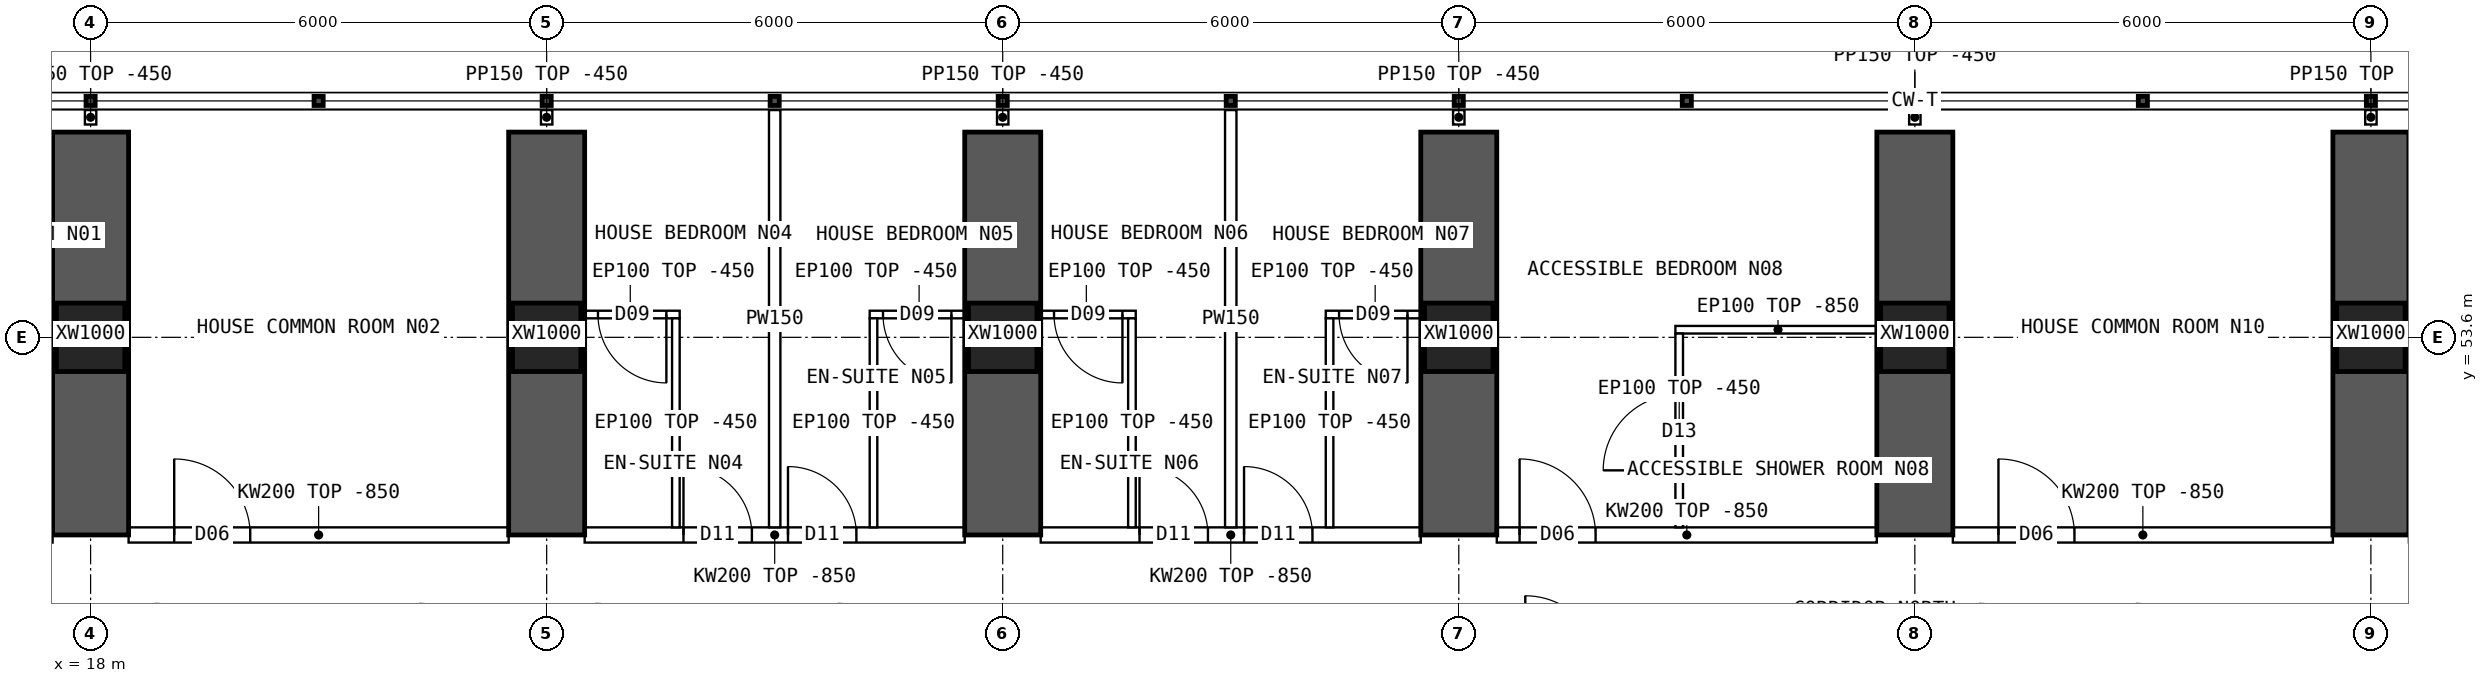
"""IFC4 building model, lengths in metres.
Left out: names, types, materials, properties, quantities, classifications, styles, units other than length and angle.
Written with IfcOpenShell. Run it as: python <this file> out.ifc"""

import sys

from ifc_helpers import new_model, si_unit, direction, frame, frame_2d, origin, origin_2d, place, context, subcontext, project, spatial, polyline, rectangle, hollow_rectangle, outline, extrude, element, fill, save


model = new_model("IFC4")
c1 = context("Model", 3, precision=1e-05, world=origin(), true_north=direction((0.0, 1.0)))
c2 = subcontext(c1, "Body", "Model", "MODEL_VIEW")
j1 = project(units=[si_unit("LENGTHUNIT", "METRE"), si_unit("PLANEANGLEUNIT", "RADIAN")], contexts=[c1])
p1 = place(None, origin())
s1 = spatial("IfcSite", under=j1, at=p1, CompositionType="ELEMENT")
p2 = place(p1, origin())
s2 = spatial("IfcBuilding", under=s1, at=p2, CompositionType="ELEMENT")
p3 = place(p2, frame((0.0, 0.0, 50.2)))
s3 = spatial("IfcBuildingStorey", under=s2, at=p3, CompositionType="ELEMENT", Elevation=50.2)
for number, where, z_axis, x_axis in (
    (1, (18.0, 53.6, 0.0), (0.0, 0.0, 1.0), (1.0, 0.0, 0.0)),
    (2, (24.0, 53.6, 0.0), (0.0, 0.0, 1.0), (1.0, 0.0, 0.0)),
    (3, (30.0, 53.6, 0.0), (0.0, 0.0, 1.0), (1.0, 0.0, 0.0)),
    (4, (36.0, 53.6, 0.0), (0.0, 0.0, 1.0), (1.0, 0.0, 0.0)),
    (5, (42.0, 53.6, 0.0), (0.0, 0.0, 1.0), (1.0, 0.0, 0.0)),
    (6, (48.0, 53.6, 0.0), (0.0, 0.0, 1.0), (1.0, 0.0, 0.0)),
):
    element("IfcColumn", number, at=place(p3, frame(where, z_axis=z_axis, x_axis=x_axis)), inside=s3, PredefinedType="COLUMN", context=c2, shape_type="SweptSolid", body=[
        extrude(hollow_rectangle(XDim=0.9, YDim=0.9, WallThickness=0.09, at=origin_2d()), origin(), (0.0, 0.0, 1.0), 3.75),
    ])
for number, where, z_axis, x_axis in (
    (7, (18.0, 51.0, 0.0), (0.0, 0.0, 1.0), (0.0, 1.0, 0.0)),
    (8, (24.0, 51.0, 0.0), (0.0, 0.0, 1.0), (0.0, 1.0, 0.0)),
    (9, (30.0, 51.0, 0.0), (0.0, 0.0, 1.0), (0.0, 1.0, 0.0)),
    (10, (36.0, 51.0, 0.0), (0.0, 0.0, 1.0), (0.0, 1.0, 0.0)),
    (11, (42.0, 51.0, 0.0), (0.0, 0.0, 1.0), (0.0, 1.0, 0.0)),
    (12, (48.0, 51.0, 0.0), (0.0, 0.0, 1.0), (0.0, 1.0, 0.0)),
):
    element("IfcWall", number, at=place(p3, frame(where, z_axis=z_axis, x_axis=x_axis)), inside=s3, PredefinedType="SHEAR", context=c2, shape_type="SweptSolid", body=[
        extrude(rectangle(XDim=5.3, YDim=1.0, at=frame_2d((2.65, 0.0))), origin(), (0.0, 0.0, 1.0), 3.75),
    ])
p4 = place(p3, frame((18.5, 51.0, 0.0), z_axis=(0.0, 0.0, 1.0), x_axis=(1.0, 0.0, 0.0)))
e13 = element("IfcWall", 13, at=p4, inside=s3, PredefinedType="SOLIDWALL", context=c2, shape_type="SweptSolid", body=[
    extrude(outline(polyline([(0.0, 0.0), (5.0, 0.0), (5.0, 2.9), (0.0, 2.9), (0.0, 0.0)])), frame((0.0, 0.1, 0.0), z_axis=(0.0, -1.0, 0.0), x_axis=(1.0, 0.0, 0.0)), (0.0, 0.0, 1.0), 0.2),
])
p5 = place(p4, frame((0.6, 0.0, 0.0)))
e14 = element("IfcOpeningElement", 14, at=p5, cuts=e13, PredefinedType="OPENING", context=c2, shape_type="SweptSolid", body=[
    extrude(rectangle(XDim=1.0, YDim=2.1, at=frame_2d((0.5, 1.05))), frame((0.0, 0.11, 0.0), z_axis=(0.0, -1.0, 0.0), x_axis=(1.0, 0.0, 0.0)), (0.0, 0.0, 1.0), 0.22),
])
p6 = place(p3, frame((24.5, 51.0, 0.0), z_axis=(0.0, 0.0, 1.0), x_axis=(1.0, 0.0, 0.0)))
e15 = element("IfcWall", 15, at=p6, inside=s3, PredefinedType="SOLIDWALL", context=c2, shape_type="SweptSolid", body=[
    extrude(outline(polyline([(0.0, 0.0), (5.0, 0.0), (5.0, 2.9), (0.0, 2.9), (0.0, 0.0)])), frame((0.0, 0.1, 0.0), z_axis=(0.0, -1.0, 0.0), x_axis=(1.0, 0.0, 0.0)), (0.0, 0.0, 1.0), 0.2),
])
p7 = place(p6, frame((1.3, 0.0, 0.0)))
e16 = element("IfcOpeningElement", 16, at=p7, cuts=e15, PredefinedType="OPENING", context=c2, shape_type="SweptSolid", body=[
    extrude(rectangle(XDim=0.9, YDim=2.1, at=frame_2d((0.45, 1.05))), frame((0.0, 0.11, 0.0), z_axis=(0.0, -1.0, 0.0), x_axis=(1.0, 0.0, 0.0)), (0.0, 0.0, 1.0), 0.22),
])
p8 = place(p6, frame((2.675, 0.0, 0.0)))
e17 = element("IfcOpeningElement", 17, at=p8, cuts=e15, PredefinedType="OPENING", context=c2, shape_type="SweptSolid", body=[
    extrude(rectangle(XDim=0.9, YDim=2.1, at=frame_2d((0.45, 1.05))), frame((0.0, 0.11, 0.0), z_axis=(0.0, -1.0, 0.0), x_axis=(1.0, 0.0, 0.0)), (0.0, 0.0, 1.0), 0.22),
])
p9 = place(p3, frame((30.5, 51.0, 0.0), z_axis=(0.0, 0.0, 1.0), x_axis=(1.0, 0.0, 0.0)))
e18 = element("IfcWall", 18, at=p9, inside=s3, PredefinedType="SOLIDWALL", context=c2, shape_type="SweptSolid", body=[
    extrude(outline(polyline([(0.0, 0.0), (5.0, 0.0), (5.0, 2.9), (0.0, 2.9), (0.0, 0.0)])), frame((0.0, 0.1, 0.0), z_axis=(0.0, -1.0, 0.0), x_axis=(1.0, 0.0, 0.0)), (0.0, 0.0, 1.0), 0.2),
])
p10 = place(p9, frame((1.3, 0.0, 0.0)))
e19 = element("IfcOpeningElement", 19, at=p10, cuts=e18, PredefinedType="OPENING", context=c2, shape_type="SweptSolid", body=[
    extrude(rectangle(XDim=0.9, YDim=2.1, at=frame_2d((0.45, 1.05))), frame((0.0, 0.11, 0.0), z_axis=(0.0, -1.0, 0.0), x_axis=(1.0, 0.0, 0.0)), (0.0, 0.0, 1.0), 0.22),
])
p11 = place(p9, frame((2.675, 0.0, 0.0)))
e20 = element("IfcOpeningElement", 20, at=p11, cuts=e18, PredefinedType="OPENING", context=c2, shape_type="SweptSolid", body=[
    extrude(rectangle(XDim=0.9, YDim=2.1, at=frame_2d((0.45, 1.05))), frame((0.0, 0.11, 0.0), z_axis=(0.0, -1.0, 0.0), x_axis=(1.0, 0.0, 0.0)), (0.0, 0.0, 1.0), 0.22),
])
p12 = place(p3, frame((36.5, 51.0, 0.0), z_axis=(0.0, 0.0, 1.0), x_axis=(1.0, 0.0, 0.0)))
e21 = element("IfcWall", 21, at=p12, inside=s3, PredefinedType="SOLIDWALL", context=c2, shape_type="SweptSolid", body=[
    extrude(outline(polyline([(0.0, 0.0), (5.0, 0.0), (5.0, 2.9), (0.0, 2.9), (0.0, 0.0)])), frame((0.0, 0.1, 0.0), z_axis=(0.0, -1.0, 0.0), x_axis=(1.0, 0.0, 0.0)), (0.0, 0.0, 1.0), 0.2),
])
p13 = place(p12, frame((0.3, 0.0, 0.0)))
e22 = element("IfcOpeningElement", 22, at=p13, cuts=e21, PredefinedType="OPENING", context=c2, shape_type="SweptSolid", body=[
    extrude(rectangle(XDim=1.0, YDim=2.1, at=frame_2d((0.5, 1.05))), frame((0.0, 0.11, 0.0), z_axis=(0.0, -1.0, 0.0), x_axis=(1.0, 0.0, 0.0)), (0.0, 0.0, 1.0), 0.22),
])
p14 = place(p3, frame((42.5, 51.0, 0.0), z_axis=(0.0, 0.0, 1.0), x_axis=(1.0, 0.0, 0.0)))
e23 = element("IfcWall", 23, at=p14, inside=s3, PredefinedType="SOLIDWALL", context=c2, shape_type="SweptSolid", body=[
    extrude(outline(polyline([(0.0, 0.0), (5.0, 0.0), (5.0, 2.9), (0.0, 2.9), (0.0, 0.0)])), frame((0.0, 0.1, 0.0), z_axis=(0.0, -1.0, 0.0), x_axis=(1.0, 0.0, 0.0)), (0.0, 0.0, 1.0), 0.2),
])
p15 = place(p14, frame((0.6, 0.0, 0.0)))
e24 = element("IfcOpeningElement", 24, at=p15, cuts=e23, PredefinedType="OPENING", context=c2, shape_type="SweptSolid", body=[
    extrude(rectangle(XDim=1.0, YDim=2.1, at=frame_2d((0.5, 1.05))), frame((0.0, 0.11, 0.0), z_axis=(0.0, -1.0, 0.0), x_axis=(1.0, 0.0, 0.0)), (0.0, 0.0, 1.0), 0.22),
])
p16 = place(p3, frame((16.25, 53.9, 0.0), z_axis=(0.0, 0.0, 1.0), x_axis=(1.0, 0.0, 0.0)))
e25 = element("IfcWall", 25, at=p16, inside=s3, PredefinedType="PARTITIONING", context=c2, shape_type="SweptSolid", body=[
    extrude(rectangle(XDim=1.3, YDim=0.1, at=frame_2d((0.65, 0.0))), origin(), (0.0, 0.0, 1.0), 3.3),
])
p17 = place(p16, frame((0.175, 0.0, 0.0)))
e26 = element("IfcOpeningElement", 26, at=p17, cuts=e25, PredefinedType="OPENING", context=c2, shape_type="SweptSolid", body=[
    extrude(rectangle(XDim=0.9, YDim=2.1, at=frame_2d((0.45, 1.05))), frame((0.0, 0.06, 0.0), z_axis=(0.0, -1.0, 0.0), x_axis=(1.0, 0.0, 0.0)), (0.0, 0.0, 1.0), 0.12),
])
p18 = place(p3, frame((27.0, 56.59, 0.0), z_axis=(0.0, 0.0, 1.0), x_axis=(0.0, -1.0, 0.0)))
e27 = element("IfcWall", 27, at=p18, inside=s3, PredefinedType="PARTITIONING", context=c2, shape_type="SweptSolid", body=[
    extrude(outline(polyline([(0.0, 0.0), (5.49, 0.0), (5.49, 2.9), (5.442, 2.9), (5.44, 3.3), (3.192, 3.3), (3.19, 2.9), (2.792, 2.9), (2.79, 3.3), (0.0, 3.3), (0.0, 0.0)])), frame((0.0, 0.075, 0.0), z_axis=(0.0, -1.0, 0.0), x_axis=(1.0, 0.0, 0.0)), (0.0, 0.0, 1.0), 0.15),
])
p19 = place(p3, frame((24.45, 53.9, 0.0), z_axis=(0.0, 0.0, 1.0), x_axis=(1.0, 0.0, 0.0)))
e28 = element("IfcWall", 28, at=p19, inside=s3, PredefinedType="PARTITIONING", context=c2, shape_type="SweptSolid", body=[
    extrude(rectangle(XDim=1.3, YDim=0.1, at=frame_2d((0.65, 0.0))), origin(), (0.0, 0.0, 1.0), 3.3),
])
p20 = place(p19, frame((0.225, 0.0, 0.0)))
e29 = element("IfcOpeningElement", 29, at=p20, cuts=e28, PredefinedType="OPENING", context=c2, shape_type="SweptSolid", body=[
    extrude(rectangle(XDim=0.9, YDim=2.1, at=frame_2d((0.45, 1.05))), frame((0.0, 0.06, 0.0), z_axis=(0.0, -1.0, 0.0), x_axis=(1.0, 0.0, 0.0)), (0.0, 0.0, 1.0), 0.12),
])
p21 = place(p3, frame((25.7, 53.85, 0.0), z_axis=(0.0, 0.0, 1.0), x_axis=(0.0, -1.0, 0.0)))
e30 = element("IfcWall", 30, at=p21, inside=s3, PredefinedType="PARTITIONING", context=c2, shape_type="SweptSolid", body=[
    extrude(outline(polyline([(0.0, 0.0), (2.75, 0.0), (2.75, 2.9), (2.702, 2.9), (2.7, 3.3), (0.452, 3.3), (0.45, 2.9), (0.0, 2.9), (0.0, 0.0)])), frame((0.0, 0.05, 0.0), z_axis=(0.0, -1.0, 0.0), x_axis=(1.0, 0.0, 0.0)), (0.0, 0.0, 1.0), 0.1),
])
p22 = place(p3, frame((28.25, 53.9, 0.0), z_axis=(0.0, 0.0, 1.0), x_axis=(1.0, 0.0, 0.0)))
e31 = element("IfcWall", 31, at=p22, inside=s3, PredefinedType="PARTITIONING", context=c2, shape_type="SweptSolid", body=[
    extrude(rectangle(XDim=1.3, YDim=0.1, at=frame_2d((0.65, 0.0))), origin(), (0.0, 0.0, 1.0), 3.3),
])
p23 = place(p22, frame((0.175, 0.0, 0.0)))
e32 = element("IfcOpeningElement", 32, at=p23, cuts=e31, PredefinedType="OPENING", context=c2, shape_type="SweptSolid", body=[
    extrude(rectangle(XDim=0.9, YDim=2.1, at=frame_2d((0.45, 1.05))), frame((0.0, 0.06, 0.0), z_axis=(0.0, -1.0, 0.0), x_axis=(1.0, 0.0, 0.0)), (0.0, 0.0, 1.0), 0.12),
])
p24 = place(p3, frame((28.3, 53.85, 0.0), z_axis=(0.0, 0.0, 1.0), x_axis=(0.0, -1.0, 0.0)))
e33 = element("IfcWall", 33, at=p24, inside=s3, PredefinedType="PARTITIONING", context=c2, shape_type="SweptSolid", body=[
    extrude(outline(polyline([(0.0, 0.0), (2.75, 0.0), (2.75, 2.9), (2.702, 2.9), (2.7, 3.3), (0.452, 3.3), (0.45, 2.9), (0.0, 2.9), (0.0, 0.0)])), frame((0.0, 0.05, 0.0), z_axis=(0.0, -1.0, 0.0), x_axis=(1.0, 0.0, 0.0)), (0.0, 0.0, 1.0), 0.1),
])
p25 = place(p3, frame((33.0, 56.59, 0.0), z_axis=(0.0, 0.0, 1.0), x_axis=(0.0, -1.0, 0.0)))
e34 = element("IfcWall", 34, at=p25, inside=s3, PredefinedType="PARTITIONING", context=c2, shape_type="SweptSolid", body=[
    extrude(outline(polyline([(0.0, 0.0), (5.49, 0.0), (5.49, 2.9), (5.442, 2.9), (5.44, 3.3), (3.192, 3.3), (3.19, 2.9), (2.792, 2.9), (2.79, 3.3), (0.0, 3.3), (0.0, 0.0)])), frame((0.0, 0.075, 0.0), z_axis=(0.0, -1.0, 0.0), x_axis=(1.0, 0.0, 0.0)), (0.0, 0.0, 1.0), 0.15),
])
p26 = place(p3, frame((30.45, 53.9, 0.0), z_axis=(0.0, 0.0, 1.0), x_axis=(1.0, 0.0, 0.0)))
e35 = element("IfcWall", 35, at=p26, inside=s3, PredefinedType="PARTITIONING", context=c2, shape_type="SweptSolid", body=[
    extrude(rectangle(XDim=1.3, YDim=0.1, at=frame_2d((0.65, 0.0))), origin(), (0.0, 0.0, 1.0), 3.3),
])
p27 = place(p26, frame((0.225, 0.0, 0.0)))
e36 = element("IfcOpeningElement", 36, at=p27, cuts=e35, PredefinedType="OPENING", context=c2, shape_type="SweptSolid", body=[
    extrude(rectangle(XDim=0.9, YDim=2.1, at=frame_2d((0.45, 1.05))), frame((0.0, 0.06, 0.0), z_axis=(0.0, -1.0, 0.0), x_axis=(1.0, 0.0, 0.0)), (0.0, 0.0, 1.0), 0.12),
])
p28 = place(p3, frame((31.7, 53.85, 0.0), z_axis=(0.0, 0.0, 1.0), x_axis=(0.0, -1.0, 0.0)))
e37 = element("IfcWall", 37, at=p28, inside=s3, PredefinedType="PARTITIONING", context=c2, shape_type="SweptSolid", body=[
    extrude(outline(polyline([(0.0, 0.0), (2.75, 0.0), (2.75, 2.9), (2.702, 2.9), (2.7, 3.3), (0.452, 3.3), (0.45, 2.9), (0.0, 2.9), (0.0, 0.0)])), frame((0.0, 0.05, 0.0), z_axis=(0.0, -1.0, 0.0), x_axis=(1.0, 0.0, 0.0)), (0.0, 0.0, 1.0), 0.1),
])
p29 = place(p3, frame((34.25, 53.9, 0.0), z_axis=(0.0, 0.0, 1.0), x_axis=(1.0, 0.0, 0.0)))
e38 = element("IfcWall", 38, at=p29, inside=s3, PredefinedType="PARTITIONING", context=c2, shape_type="SweptSolid", body=[
    extrude(rectangle(XDim=1.3, YDim=0.1, at=frame_2d((0.65, 0.0))), origin(), (0.0, 0.0, 1.0), 3.3),
])
p30 = place(p29, frame((0.175, 0.0, 0.0)))
e39 = element("IfcOpeningElement", 39, at=p30, cuts=e38, PredefinedType="OPENING", context=c2, shape_type="SweptSolid", body=[
    extrude(rectangle(XDim=0.9, YDim=2.1, at=frame_2d((0.45, 1.05))), frame((0.0, 0.06, 0.0), z_axis=(0.0, -1.0, 0.0), x_axis=(1.0, 0.0, 0.0)), (0.0, 0.0, 1.0), 0.12),
])
p31 = place(p3, frame((34.3, 53.85, 0.0), z_axis=(0.0, 0.0, 1.0), x_axis=(0.0, -1.0, 0.0)))
e40 = element("IfcWall", 40, at=p31, inside=s3, PredefinedType="PARTITIONING", context=c2, shape_type="SweptSolid", body=[
    extrude(outline(polyline([(0.0, 0.0), (2.75, 0.0), (2.75, 2.9), (2.702, 2.9), (2.7, 3.3), (0.452, 3.3), (0.45, 2.9), (0.0, 2.9), (0.0, 0.0)])), frame((0.0, 0.05, 0.0), z_axis=(0.0, -1.0, 0.0), x_axis=(1.0, 0.0, 0.0)), (0.0, 0.0, 1.0), 0.1),
])
p32 = place(p3, frame((38.85, 53.7, 0.0), z_axis=(0.0, 0.0, 1.0), x_axis=(1.0, 0.0, 0.0)))
e41 = element("IfcWall", 41, at=p32, inside=s3, PredefinedType="PARTITIONING", context=c2, shape_type="SweptSolid", body=[
    extrude(outline(polyline([(0.0, 0.0), (2.7, 0.0), (2.7, 2.9), (0.0, 2.9), (0.0, 0.0)])), frame((0.0, 0.05, 0.0), z_axis=(0.0, -1.0, 0.0), x_axis=(1.0, 0.0, 0.0)), (0.0, 0.0, 1.0), 0.1),
])
p33 = place(p3, frame((38.9, 53.65, 0.0), z_axis=(0.0, 0.0, 1.0), x_axis=(0.0, -1.0, 0.0)))
e42 = element("IfcWall", 42, at=p33, inside=s3, PredefinedType="PARTITIONING", context=c2, shape_type="SweptSolid", body=[
    extrude(outline(polyline([(0.0, 0.0), (2.55, 0.0), (2.55, 2.9), (2.502, 2.9), (2.5, 3.3), (0.252, 3.3), (0.25, 2.9), (0.0, 2.9), (0.0, 0.0)])), frame((0.0, 0.05, 0.0), z_axis=(0.0, -1.0, 0.0), x_axis=(1.0, 0.0, 0.0)), (0.0, 0.0, 1.0), 0.1),
])
p34 = place(p33, frame((0.8, 0.0, 0.0)))
e43 = element("IfcOpeningElement", 43, at=p34, cuts=e42, PredefinedType="OPENING", context=c2, shape_type="SweptSolid", body=[
    extrude(rectangle(XDim=1.0, YDim=2.1, at=frame_2d((0.5, 1.05))), frame((0.0, 0.06, 0.0), z_axis=(0.0, -1.0, 0.0), x_axis=(1.0, 0.0, 0.0)), (0.0, 0.0, 1.0), 0.12),
])
for number, where, z_axis, x_axis in (
    (44, (18.0, 56.4, 0.0), (0.0, 0.0, 1.0), (0.0, 1.0, 0.0)),
    (45, (24.0, 56.4, 0.0), (0.0, 0.0, 1.0), (0.0, 1.0, 0.0)),
    (46, (30.0, 56.4, 0.0), (0.0, 0.0, 1.0), (0.0, 1.0, 0.0)),
    (47, (36.0, 56.4, 0.0), (0.0, 0.0, 1.0), (0.0, 1.0, 0.0)),
    (48, (42.0, 56.4, 0.0), (0.0, 0.0, 1.0), (0.0, 1.0, 0.0)),
    (49, (48.0, 56.4, 0.0), (0.0, 0.0, 1.0), (0.0, 1.0, 0.0)),
):
    element("IfcWall", number, at=place(p3, frame(where, z_axis=z_axis, x_axis=x_axis)), inside=s3, PredefinedType="PARTITIONING", context=c2, shape_type="SweptSolid", body=[
        extrude(rectangle(XDim=0.19, YDim=0.15, at=frame_2d((0.095, 0.0))), origin(), (0.0, 0.0, 1.0), 3.3),
    ])
p35 = place(p5, origin())
e50 = element("IfcDoor", 50, at=p35, inside=s3, OperationType="SINGLE_SWING_LEFT", PredefinedType="DOOR", context=c2, shape_type="SweptSolid", body=[
    extrude(rectangle(XDim=1.0, YDim=2.1, at=frame_2d((0.5, 1.05))), frame((0.0, 0.025, 0.0), z_axis=(0.0, -1.0, 0.0), x_axis=(1.0, 0.0, 0.0)), (0.0, 0.0, 1.0), 0.05),
])
fill(e14, e50)
p36 = place(p20, origin())
e51 = element("IfcDoor", 51, at=p36, inside=s3, OperationType="SINGLE_SWING_RIGHT", PredefinedType="DOOR", context=c2, shape_type="SweptSolid", body=[
    extrude(rectangle(XDim=0.9, YDim=2.1, at=frame_2d((0.45, 1.05))), frame((0.0, 0.025, 0.0), z_axis=(0.0, -1.0, 0.0), x_axis=(1.0, 0.0, 0.0)), (0.0, 0.0, 1.0), 0.05),
])
fill(e29, e51)
p37 = place(p7, origin())
e52 = element("IfcDoor", 52, at=p37, inside=s3, OperationType="SINGLE_SWING_LEFT", PredefinedType="DOOR", context=c2, shape_type="SweptSolid", body=[
    extrude(rectangle(XDim=0.9, YDim=2.1, at=frame_2d((0.45, 1.05))), frame((0.0, 0.025, 0.0), z_axis=(0.0, -1.0, 0.0), x_axis=(1.0, 0.0, 0.0)), (0.0, 0.0, 1.0), 0.05),
])
fill(e16, e52)
p38 = place(p23, origin())
e53 = element("IfcDoor", 53, at=p38, inside=s3, OperationType="SINGLE_SWING_RIGHT", PredefinedType="DOOR", context=c2, shape_type="SweptSolid", body=[
    extrude(rectangle(XDim=0.9, YDim=2.1, at=frame_2d((0.45, 1.05))), frame((0.0, 0.025, 0.0), z_axis=(0.0, -1.0, 0.0), x_axis=(1.0, 0.0, 0.0)), (0.0, 0.0, 1.0), 0.05),
])
fill(e32, e53)
p39 = place(p8, origin())
e54 = element("IfcDoor", 54, at=p39, inside=s3, OperationType="SINGLE_SWING_LEFT", PredefinedType="DOOR", context=c2, shape_type="SweptSolid", body=[
    extrude(rectangle(XDim=0.9, YDim=2.1, at=frame_2d((0.45, 1.05))), frame((0.0, 0.025, 0.0), z_axis=(0.0, -1.0, 0.0), x_axis=(1.0, 0.0, 0.0)), (0.0, 0.0, 1.0), 0.05),
])
fill(e17, e54)
p40 = place(p27, origin())
e55 = element("IfcDoor", 55, at=p40, inside=s3, OperationType="SINGLE_SWING_RIGHT", PredefinedType="DOOR", context=c2, shape_type="SweptSolid", body=[
    extrude(rectangle(XDim=0.9, YDim=2.1, at=frame_2d((0.45, 1.05))), frame((0.0, 0.025, 0.0), z_axis=(0.0, -1.0, 0.0), x_axis=(1.0, 0.0, 0.0)), (0.0, 0.0, 1.0), 0.05),
])
fill(e36, e55)
p41 = place(p10, origin())
e56 = element("IfcDoor", 56, at=p41, inside=s3, OperationType="SINGLE_SWING_LEFT", PredefinedType="DOOR", context=c2, shape_type="SweptSolid", body=[
    extrude(rectangle(XDim=0.9, YDim=2.1, at=frame_2d((0.45, 1.05))), frame((0.0, 0.025, 0.0), z_axis=(0.0, -1.0, 0.0), x_axis=(1.0, 0.0, 0.0)), (0.0, 0.0, 1.0), 0.05),
])
fill(e19, e56)
p42 = place(p30, origin())
e57 = element("IfcDoor", 57, at=p42, inside=s3, OperationType="SINGLE_SWING_RIGHT", PredefinedType="DOOR", context=c2, shape_type="SweptSolid", body=[
    extrude(rectangle(XDim=0.9, YDim=2.1, at=frame_2d((0.45, 1.05))), frame((0.0, 0.025, 0.0), z_axis=(0.0, -1.0, 0.0), x_axis=(1.0, 0.0, 0.0)), (0.0, 0.0, 1.0), 0.05),
])
fill(e39, e57)
p43 = place(p11, origin())
e58 = element("IfcDoor", 58, at=p43, inside=s3, OperationType="SINGLE_SWING_LEFT", PredefinedType="DOOR", context=c2, shape_type="SweptSolid", body=[
    extrude(rectangle(XDim=0.9, YDim=2.1, at=frame_2d((0.45, 1.05))), frame((0.0, 0.025, 0.0), z_axis=(0.0, -1.0, 0.0), x_axis=(1.0, 0.0, 0.0)), (0.0, 0.0, 1.0), 0.05),
])
fill(e20, e58)
p44 = place(p34, origin())
e59 = element("IfcDoor", 59, at=p44, inside=s3, OperationType="SINGLE_SWING_RIGHT", PredefinedType="DOOR", context=c2, shape_type="SweptSolid", body=[
    extrude(rectangle(XDim=1.0, YDim=2.1, at=frame_2d((0.5, 1.05))), frame((0.0, 0.025, 0.0), z_axis=(0.0, -1.0, 0.0), x_axis=(1.0, 0.0, 0.0)), (0.0, 0.0, 1.0), 0.05),
])
fill(e43, e59)
p45 = place(p13, origin())
e60 = element("IfcDoor", 60, at=p45, inside=s3, OperationType="SINGLE_SWING_LEFT", PredefinedType="DOOR", context=c2, shape_type="SweptSolid", body=[
    extrude(rectangle(XDim=1.0, YDim=2.1, at=frame_2d((0.5, 1.05))), frame((0.0, 0.025, 0.0), z_axis=(0.0, -1.0, 0.0), x_axis=(1.0, 0.0, 0.0)), (0.0, 0.0, 1.0), 0.05),
])
fill(e22, e60)
p46 = place(p15, origin())
e61 = element("IfcDoor", 61, at=p46, inside=s3, OperationType="SINGLE_SWING_LEFT", PredefinedType="DOOR", context=c2, shape_type="SweptSolid", body=[
    extrude(rectangle(XDim=1.0, YDim=2.1, at=frame_2d((0.5, 1.05))), frame((0.0, 0.025, 0.0), z_axis=(0.0, -1.0, 0.0), x_axis=(1.0, 0.0, 0.0)), (0.0, 0.0, 1.0), 0.05),
])
fill(e24, e61)
save(model, sys.argv[1])
